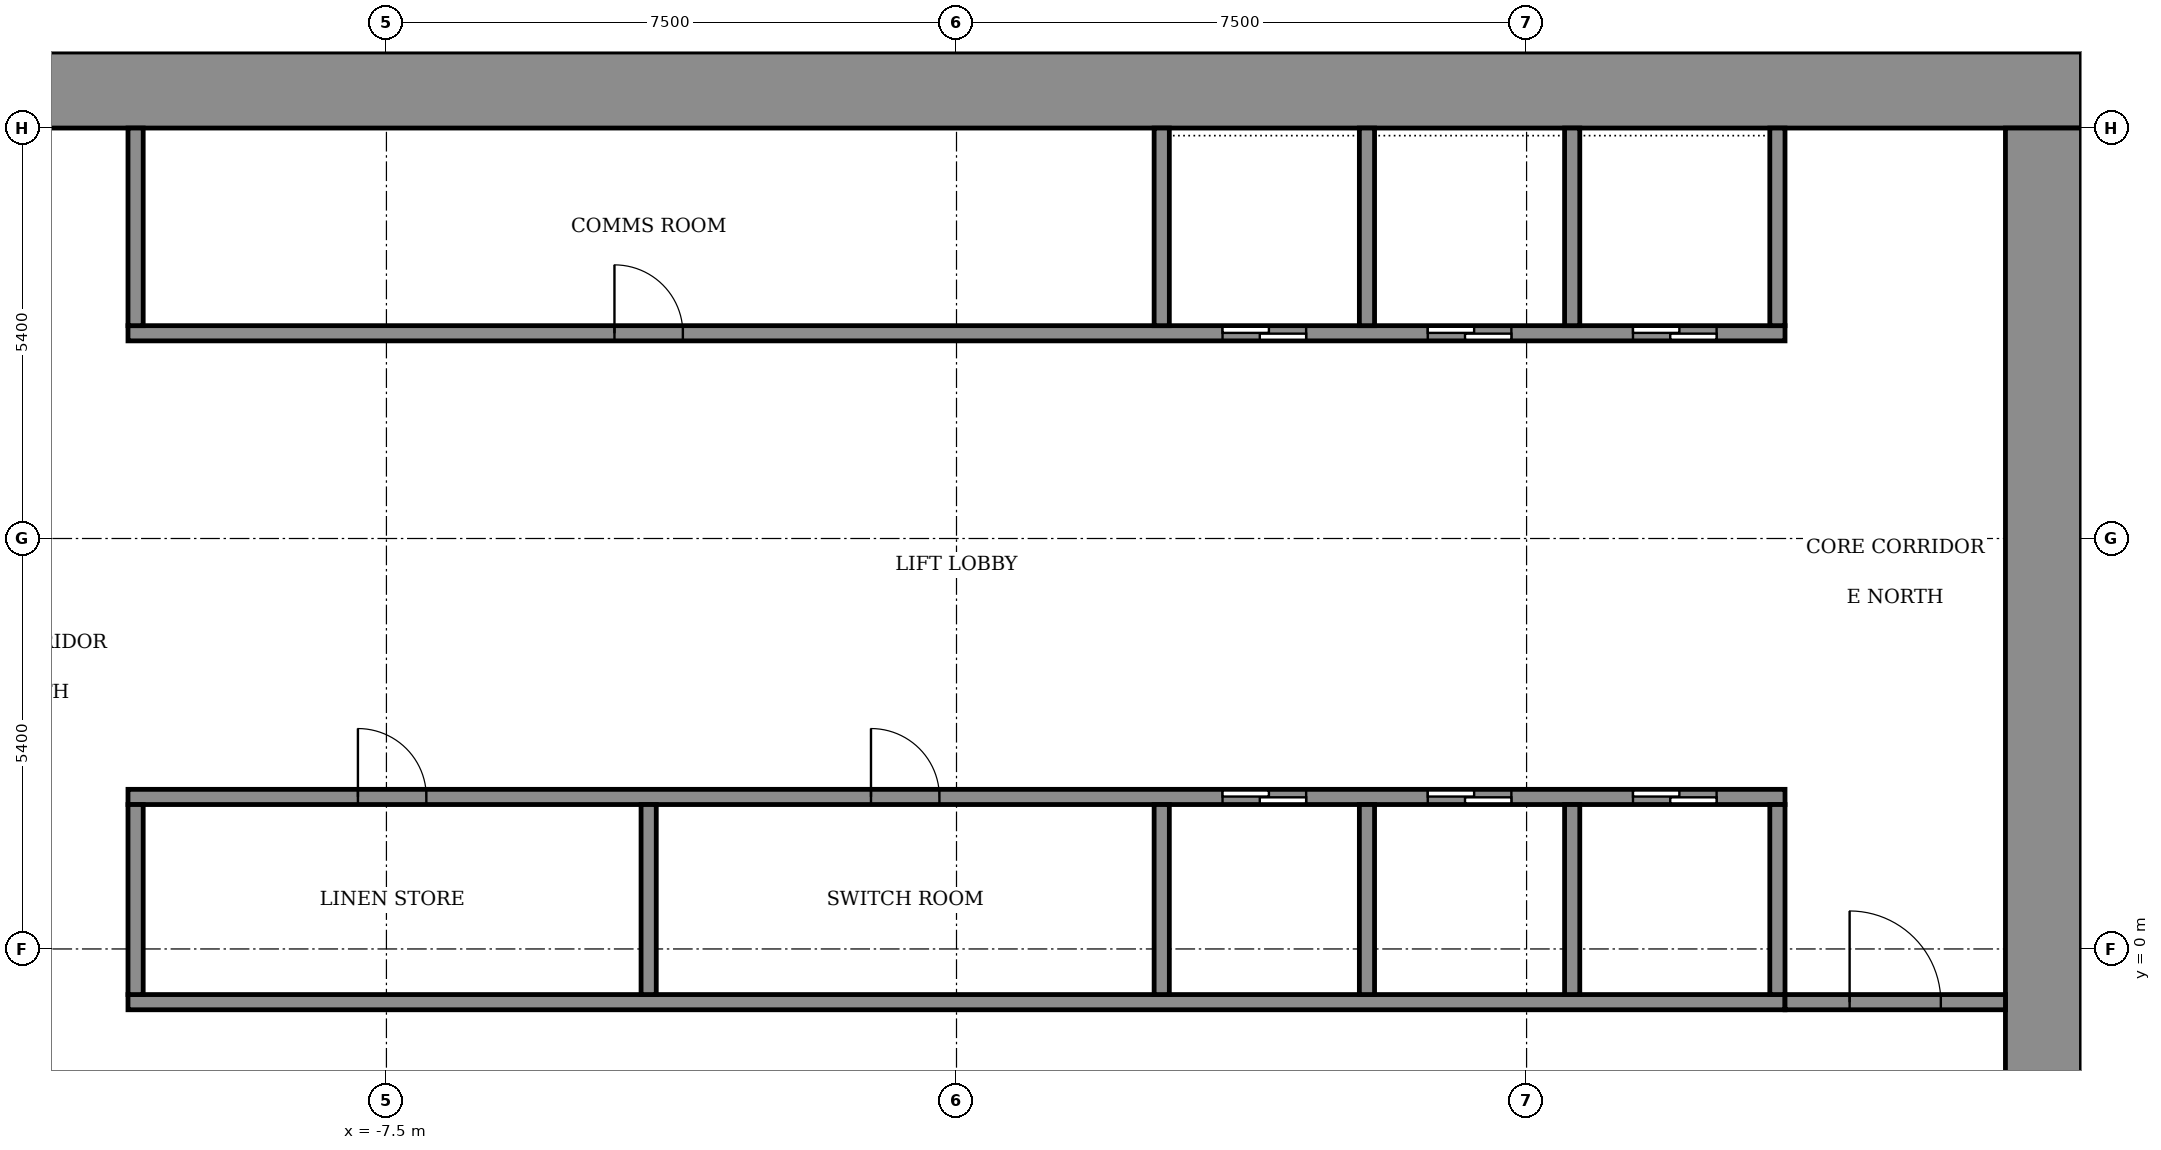
"""IFC4 building model, lengths in metres.
Left out: names, types, materials, properties, quantities, classifications, styles, units other than length and angle.
Written with IfcOpenShell. Run it as: python <this file> out.ifc"""

import sys

from ifc_helpers import new_model, si_unit, direction, frame, frame_2d, origin, place, context, subcontext, project, spatial, rectangle, extrude, element, fill, save


model = new_model("IFC4")
c1 = context("Model", 3, precision=1e-05, world=origin(), true_north=direction((0.0, 1.0)))
c2 = subcontext(c1, "Body", "Model", "MODEL_VIEW")
j1 = project(units=[si_unit("LENGTHUNIT", "METRE"), si_unit("PLANEANGLEUNIT", "RADIAN")], contexts=[c1])
p1 = place(None, origin())
s1 = spatial("IfcSite", under=j1, at=p1, CompositionType="ELEMENT")
p2 = place(p1, origin())
s2 = spatial("IfcBuilding", under=s1, at=p2, CompositionType="ELEMENT")
p3 = place(p2, frame((0.0, 0.0, 125.5)))
s3 = spatial("IfcBuildingStorey", under=s2, at=p3, CompositionType="ELEMENT", Elevation=125.5)
p4 = place(p3, frame((-14.8, 11.3, 0.0), z_axis=(0.0, 0.0, 1.0), x_axis=(1.0, 0.0, 0.0)))
e1 = element("IfcWall", 1, at=p4, inside=s3, PredefinedType="SHEAR", context=c2, shape_type="SweptSolid", body=[
    extrude(rectangle(XDim=29.6, YDim=1.0, at=frame_2d((14.8, 0.0))), origin(), (0.0, 0.0, 1.0), 4.6),
])
p5 = place(p3, frame((14.3, -10.8, 0.0), z_axis=(0.0, 0.0, 1.0), x_axis=(0.0, 1.0, 0.0)))
e2 = element("IfcWall", 2, at=p5, inside=s3, PredefinedType="SHEAR", context=c2, shape_type="SweptSolid", body=[
    extrude(rectangle(XDim=21.6, YDim=1.0, at=frame_2d((10.8, 0.0))), origin(), (0.0, 0.0, 1.0), 4.6),
])
p6 = place(p5, frame((1.2, 0.0, 0.0)))
e3 = element("IfcOpeningElement", 3, at=p6, cuts=e2, PredefinedType="OPENING", context=c2, shape_type="SweptSolid", body=[
    extrude(rectangle(XDim=1.2, YDim=2.1, at=frame_2d((0.6, 1.05))), frame((0.0, 0.51, 0.0), z_axis=(0.0, -1.0, 0.0), x_axis=(1.0, 0.0, 0.0)), (0.0, 0.0, 1.0), 1.02),
])
p7 = place(p3, frame((-10.9, -0.7, 0.0), z_axis=(0.0, 0.0, 1.0), x_axis=(1.0, 0.0, 0.0)))
e4 = element("IfcWall", 4, at=p7, inside=s3, PredefinedType="SHEAR", context=c2, shape_type="SweptSolid", body=[
    extrude(rectangle(XDim=21.8, YDim=0.2, at=frame_2d((10.9, 0.0))), origin(), (0.0, 0.0, 1.0), 4.05),
])
p8 = place(p3, frame((-10.9, 2.0, 0.0), z_axis=(0.0, 0.0, 1.0), x_axis=(1.0, 0.0, 0.0)))
e5 = element("IfcWall", 5, at=p8, inside=s3, PredefinedType="SHEAR", context=c2, shape_type="SweptSolid", body=[
    extrude(rectangle(XDim=21.8, YDim=0.2, at=frame_2d((10.9, 0.0))), origin(), (0.0, 0.0, 1.0), 4.05),
])
p9 = place(p8, frame((14.4, 0.0, 0.0)))
e6 = element("IfcOpeningElement", 6, at=p9, cuts=e5, PredefinedType="OPENING", context=c2, shape_type="SweptSolid", body=[
    extrude(rectangle(XDim=1.1, YDim=2.1, at=frame_2d((0.55, 1.05))), frame((0.0, 0.11, 0.0), z_axis=(0.0, -1.0, 0.0), x_axis=(1.0, 0.0, 0.0)), (0.0, 0.0, 1.0), 0.22),
])
p10 = place(p8, frame((17.1, 0.0, 0.0)))
e7 = element("IfcOpeningElement", 7, at=p10, cuts=e5, PredefinedType="OPENING", context=c2, shape_type="SweptSolid", body=[
    extrude(rectangle(XDim=1.1, YDim=2.1, at=frame_2d((0.55, 1.05))), frame((0.0, 0.11, 0.0), z_axis=(0.0, -1.0, 0.0), x_axis=(1.0, 0.0, 0.0)), (0.0, 0.0, 1.0), 0.22),
])
p11 = place(p8, frame((19.8, 0.0, 0.0)))
e8 = element("IfcOpeningElement", 8, at=p11, cuts=e5, PredefinedType="OPENING", context=c2, shape_type="SweptSolid", body=[
    extrude(rectangle(XDim=1.1, YDim=2.1, at=frame_2d((0.55, 1.05))), frame((0.0, 0.11, 0.0), z_axis=(0.0, -1.0, 0.0), x_axis=(1.0, 0.0, 0.0)), (0.0, 0.0, 1.0), 0.22),
])
p12 = place(p8, frame((3.025, 0.0, 0.0)))
e9 = element("IfcOpeningElement", 9, at=p12, cuts=e5, PredefinedType="OPENING", context=c2, shape_type="SweptSolid", body=[
    extrude(rectangle(XDim=0.9, YDim=2.1, at=frame_2d((0.45, 1.05))), frame((0.0, 0.11, 0.0), z_axis=(0.0, -1.0, 0.0), x_axis=(1.0, 0.0, 0.0)), (0.0, 0.0, 1.0), 0.22),
])
p13 = place(p8, frame((9.775, 0.0, 0.0)))
e10 = element("IfcOpeningElement", 10, at=p13, cuts=e5, PredefinedType="OPENING", context=c2, shape_type="SweptSolid", body=[
    extrude(rectangle(XDim=0.9, YDim=2.1, at=frame_2d((0.45, 1.05))), frame((0.0, 0.11, 0.0), z_axis=(0.0, -1.0, 0.0), x_axis=(1.0, 0.0, 0.0)), (0.0, 0.0, 1.0), 0.22),
])
p14 = place(p3, frame((-10.9, 8.1, 0.0), z_axis=(0.0, 0.0, 1.0), x_axis=(1.0, 0.0, 0.0)))
e11 = element("IfcWall", 11, at=p14, inside=s3, PredefinedType="SHEAR", context=c2, shape_type="SweptSolid", body=[
    extrude(rectangle(XDim=21.8, YDim=0.2, at=frame_2d((10.9, 0.0))), origin(), (0.0, 0.0, 1.0), 4.05),
])
p15 = place(p14, frame((14.4, 0.0, 0.0)))
e12 = element("IfcOpeningElement", 12, at=p15, cuts=e11, PredefinedType="OPENING", context=c2, shape_type="SweptSolid", body=[
    extrude(rectangle(XDim=1.1, YDim=2.1, at=frame_2d((0.55, 1.05))), frame((0.0, 0.11, 0.0), z_axis=(0.0, -1.0, 0.0), x_axis=(1.0, 0.0, 0.0)), (0.0, 0.0, 1.0), 0.22),
])
p16 = place(p14, frame((17.1, 0.0, 0.0)))
e13 = element("IfcOpeningElement", 13, at=p16, cuts=e11, PredefinedType="OPENING", context=c2, shape_type="SweptSolid", body=[
    extrude(rectangle(XDim=1.1, YDim=2.1, at=frame_2d((0.55, 1.05))), frame((0.0, 0.11, 0.0), z_axis=(0.0, -1.0, 0.0), x_axis=(1.0, 0.0, 0.0)), (0.0, 0.0, 1.0), 0.22),
])
p17 = place(p14, frame((19.8, 0.0, 0.0)))
e14 = element("IfcOpeningElement", 14, at=p17, cuts=e11, PredefinedType="OPENING", context=c2, shape_type="SweptSolid", body=[
    extrude(rectangle(XDim=1.1, YDim=2.1, at=frame_2d((0.55, 1.05))), frame((0.0, 0.11, 0.0), z_axis=(0.0, -1.0, 0.0), x_axis=(1.0, 0.0, 0.0)), (0.0, 0.0, 1.0), 0.22),
])
p18 = place(p14, frame((6.4, 0.0, 0.0)))
e15 = element("IfcOpeningElement", 15, at=p18, cuts=e11, PredefinedType="OPENING", context=c2, shape_type="SweptSolid", body=[
    extrude(rectangle(XDim=0.9, YDim=2.1, at=frame_2d((0.45, 1.05))), frame((0.0, 0.11, 0.0), z_axis=(0.0, -1.0, 0.0), x_axis=(1.0, 0.0, 0.0)), (0.0, 0.0, 1.0), 0.22),
])
for number, where, z_axis, x_axis in (
    (16, (-10.8, -0.6, 0.0), (0.0, 0.0, 1.0), (0.0, 1.0, 0.0)),
    (17, (-4.05, -0.6, 0.0), (0.0, 0.0, 1.0), (0.0, 1.0, 0.0)),
):
    element("IfcWall", number, at=place(p3, frame(where, z_axis=z_axis, x_axis=x_axis)), inside=s3, PredefinedType="STANDARD", context=c2, shape_type="SweptSolid", body=[
        extrude(rectangle(XDim=2.5, YDim=0.2, at=frame_2d((1.25, 0.0))), origin(), (0.0, 0.0, 1.0), 4.05),
    ])
for number, where, z_axis, x_axis in (
    (18, (2.7, -0.6, 0.0), (0.0, 0.0, 1.0), (0.0, 1.0, 0.0)),
    (19, (5.4, -0.6, 0.0), (0.0, 0.0, 1.0), (0.0, 1.0, 0.0)),
    (20, (8.1, -0.6, 0.0), (0.0, 0.0, 1.0), (0.0, 1.0, 0.0)),
    (21, (10.8, -0.6, 0.0), (0.0, 0.0, 1.0), (0.0, 1.0, 0.0)),
):
    element("IfcWall", number, at=place(p3, frame(where, z_axis=z_axis, x_axis=x_axis)), inside=s3, PredefinedType="SHEAR", context=c2, shape_type="SweptSolid", body=[
        extrude(rectangle(XDim=2.5, YDim=0.2, at=frame_2d((1.25, 0.0))), origin(), (0.0, 0.0, 1.0), 4.05),
    ])
p19 = place(p3, frame((-10.8, 8.2, 0.0), z_axis=(0.0, 0.0, 1.0), x_axis=(0.0, 1.0, 0.0)))
e22 = element("IfcWall", 22, at=p19, inside=s3, PredefinedType="STANDARD", context=c2, shape_type="SweptSolid", body=[
    extrude(rectangle(XDim=2.6, YDim=0.2, at=frame_2d((1.3, 0.0))), origin(), (0.0, 0.0, 1.0), 4.05),
])
for number, where, z_axis, x_axis in (
    (23, (2.7, 8.2, 0.0), (0.0, 0.0, 1.0), (0.0, 1.0, 0.0)),
    (24, (5.4, 8.2, 0.0), (0.0, 0.0, 1.0), (0.0, 1.0, 0.0)),
    (25, (8.1, 8.2, 0.0), (0.0, 0.0, 1.0), (0.0, 1.0, 0.0)),
    (26, (10.8, 8.2, 0.0), (0.0, 0.0, 1.0), (0.0, 1.0, 0.0)),
):
    element("IfcWall", number, at=place(p3, frame(where, z_axis=z_axis, x_axis=x_axis)), inside=s3, PredefinedType="SHEAR", context=c2, shape_type="SweptSolid", body=[
        extrude(rectangle(XDim=2.6, YDim=0.2, at=frame_2d((1.3, 0.0))), origin(), (0.0, 0.0, 1.0), 4.05),
    ])
p20 = place(p3, frame((10.9, -0.7, 0.0), z_axis=(0.0, 0.0, 1.0), x_axis=(1.0, 0.0, 0.0)))
e27 = element("IfcWall", 27, at=p20, inside=s3, PredefinedType="STANDARD", context=c2, shape_type="SweptSolid", body=[
    extrude(rectangle(XDim=2.9, YDim=0.2, at=frame_2d((1.45, 0.0))), origin(), (0.0, 0.0, 1.0), 4.05),
])
p21 = place(p20, frame((0.85, 0.0, 0.0)))
e28 = element("IfcOpeningElement", 28, at=p21, cuts=e27, PredefinedType="OPENING", context=c2, shape_type="SweptSolid", body=[
    extrude(rectangle(XDim=1.2, YDim=2.1, at=frame_2d((0.6, 1.05))), frame((0.0, 0.11, 0.0), z_axis=(0.0, -1.0, 0.0), x_axis=(1.0, 0.0, 0.0)), (0.0, 0.0, 1.0), 0.22),
])
p22 = place(p9, origin())
e29 = element("IfcDoor", 29, at=p22, inside=s3, OperationType="SLIDING_TO_LEFT", PredefinedType="DOOR", context=c2, shape_type="SweptSolid", body=[
    extrude(rectangle(XDim=1.1, YDim=2.1, at=frame_2d((0.55, 1.05))), frame((0.0, 0.025, 0.0), z_axis=(0.0, -1.0, 0.0), x_axis=(1.0, 0.0, 0.0)), (0.0, 0.0, 1.0), 0.05),
])
fill(e6, e29)
p23 = place(p10, origin())
e30 = element("IfcDoor", 30, at=p23, inside=s3, OperationType="SLIDING_TO_LEFT", PredefinedType="DOOR", context=c2, shape_type="SweptSolid", body=[
    extrude(rectangle(XDim=1.1, YDim=2.1, at=frame_2d((0.55, 1.05))), frame((0.0, 0.025, 0.0), z_axis=(0.0, -1.0, 0.0), x_axis=(1.0, 0.0, 0.0)), (0.0, 0.0, 1.0), 0.05),
])
fill(e7, e30)
p24 = place(p11, origin())
e31 = element("IfcDoor", 31, at=p24, inside=s3, OperationType="SLIDING_TO_LEFT", PredefinedType="DOOR", context=c2, shape_type="SweptSolid", body=[
    extrude(rectangle(XDim=1.1, YDim=2.1, at=frame_2d((0.55, 1.05))), frame((0.0, 0.025, 0.0), z_axis=(0.0, -1.0, 0.0), x_axis=(1.0, 0.0, 0.0)), (0.0, 0.0, 1.0), 0.05),
])
fill(e8, e31)
p25 = place(p15, origin())
e32 = element("IfcDoor", 32, at=p25, inside=s3, OperationType="SLIDING_TO_LEFT", PredefinedType="DOOR", context=c2, shape_type="SweptSolid", body=[
    extrude(rectangle(XDim=1.1, YDim=2.1, at=frame_2d((0.55, 1.05))), frame((0.0, 0.025, 0.0), z_axis=(0.0, -1.0, 0.0), x_axis=(1.0, 0.0, 0.0)), (0.0, 0.0, 1.0), 0.05),
])
fill(e12, e32)
p26 = place(p16, origin())
e33 = element("IfcDoor", 33, at=p26, inside=s3, OperationType="SLIDING_TO_LEFT", PredefinedType="DOOR", context=c2, shape_type="SweptSolid", body=[
    extrude(rectangle(XDim=1.1, YDim=2.1, at=frame_2d((0.55, 1.05))), frame((0.0, 0.025, 0.0), z_axis=(0.0, -1.0, 0.0), x_axis=(1.0, 0.0, 0.0)), (0.0, 0.0, 1.0), 0.05),
])
fill(e13, e33)
p27 = place(p17, origin())
e34 = element("IfcDoor", 34, at=p27, inside=s3, OperationType="SLIDING_TO_LEFT", PredefinedType="DOOR", context=c2, shape_type="SweptSolid", body=[
    extrude(rectangle(XDim=1.1, YDim=2.1, at=frame_2d((0.55, 1.05))), frame((0.0, 0.025, 0.0), z_axis=(0.0, -1.0, 0.0), x_axis=(1.0, 0.0, 0.0)), (0.0, 0.0, 1.0), 0.05),
])
fill(e14, e34)
p28 = place(p12, origin())
e35 = element("IfcDoor", 35, at=p28, inside=s3, OperationType="SINGLE_SWING_RIGHT", PredefinedType="DOOR", context=c2, shape_type="SweptSolid", body=[
    extrude(rectangle(XDim=0.9, YDim=2.1, at=frame_2d((0.45, 1.05))), frame((0.0, 0.025, 0.0), z_axis=(0.0, -1.0, 0.0), x_axis=(1.0, 0.0, 0.0)), (0.0, 0.0, 1.0), 0.05),
])
fill(e9, e35)
p29 = place(p13, origin())
e36 = element("IfcDoor", 36, at=p29, inside=s3, OperationType="SINGLE_SWING_LEFT", PredefinedType="DOOR", context=c2, shape_type="SweptSolid", body=[
    extrude(rectangle(XDim=0.9, YDim=2.1, at=frame_2d((0.45, 1.05))), frame((0.0, 0.025, 0.0), z_axis=(0.0, -1.0, 0.0), x_axis=(1.0, 0.0, 0.0)), (0.0, 0.0, 1.0), 0.05),
])
fill(e10, e36)
p30 = place(p18, origin())
e37 = element("IfcDoor", 37, at=p30, inside=s3, OperationType="SINGLE_SWING_LEFT", PredefinedType="DOOR", context=c2, shape_type="SweptSolid", body=[
    extrude(rectangle(XDim=0.9, YDim=2.1, at=frame_2d((0.45, 1.05))), frame((0.0, 0.025, 0.0), z_axis=(0.0, -1.0, 0.0), x_axis=(1.0, 0.0, 0.0)), (0.0, 0.0, 1.0), 0.05),
])
fill(e15, e37)
p31 = place(p21, origin())
e38 = element("IfcDoor", 38, at=p31, inside=s3, OperationType="SINGLE_SWING_LEFT", PredefinedType="DOOR", context=c2, shape_type="SweptSolid", body=[
    extrude(rectangle(XDim=1.2, YDim=2.1, at=frame_2d((0.6, 1.05))), frame((0.0, 0.025, 0.0), z_axis=(0.0, -1.0, 0.0), x_axis=(1.0, 0.0, 0.0)), (0.0, 0.0, 1.0), 0.05),
])
fill(e28, e38)
save(model, sys.argv[1])
